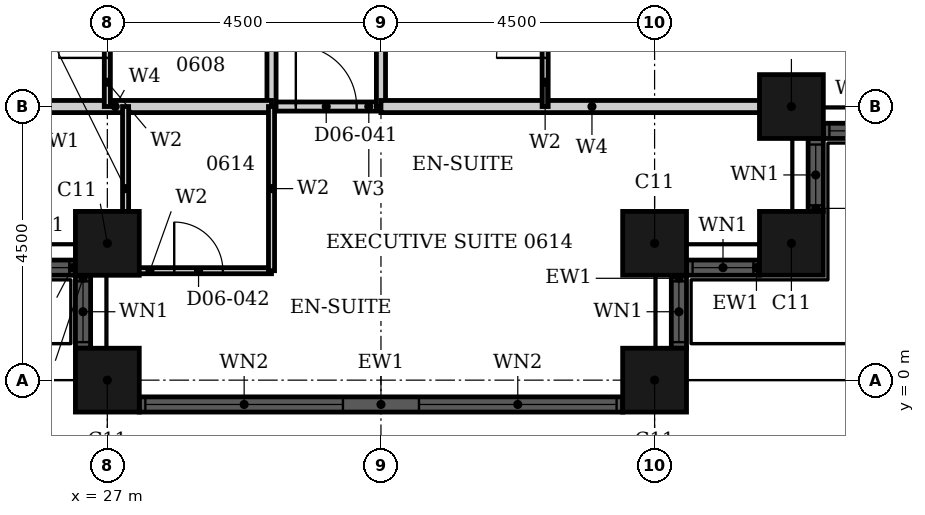
"""IFC4 building model, lengths in metres.
Left out: names, types, materials, properties, quantities, classifications, styles, units other than length and angle.
Written with IfcOpenShell. Run it as: python <this file> out.ifc"""

import sys

from ifc_helpers import new_model, si_unit, direction, frame, frame_2d, origin, origin_2d, place, context, subcontext, project, spatial, rectangle, hollow_rectangle, extrude, element, fill, save


model = new_model("IFC4")
c1 = context("Model", 3, precision=1e-05, world=origin(), true_north=direction((0.0, 1.0)))
c2 = subcontext(c1, "Body", "Model", "MODEL_VIEW")
j1 = project(units=[si_unit("LENGTHUNIT", "METRE"), si_unit("PLANEANGLEUNIT", "RADIAN")], contexts=[c1])
p1 = place(None, origin())
s1 = spatial("IfcSite", under=j1, at=p1, CompositionType="ELEMENT")
p2 = place(p1, origin())
s2 = spatial("IfcBuilding", under=s1, at=p2, CompositionType="ELEMENT")
p3 = place(p2, frame((0.0, 0.0, 33.6)))
s3 = spatial("IfcBuildingStorey", under=s2, at=p3, CompositionType="ELEMENT", Elevation=33.6)
for number, where, z_axis, x_axis in (
    (1, (27.0, 2.25, 0.0), (0.0, 0.0, 1.0), (1.0, 0.0, 0.0)),
    (2, (27.0, 0.0, 0.0), (0.0, 0.0, 1.0), (1.0, 0.0, 0.0)),
    (3, (36.0, 0.0, 0.0), (0.0, 0.0, 1.0), (1.0, 0.0, 0.0)),
    (4, (36.0, 2.25, 0.0), (0.0, 0.0, 1.0), (1.0, 0.0, 0.0)),
    (5, (38.25, 2.25, 0.0), (0.0, 0.0, 1.0), (1.0, 0.0, 0.0)),
    (6, (38.25, 4.5, 0.0), (0.0, 0.0, 1.0), (1.0, 0.0, 0.0)),
):
    element("IfcColumn", number, at=place(p3, frame(where, z_axis=z_axis, x_axis=x_axis)), inside=s3, PredefinedType="COLUMN", context=c2, shape_type="SweptSolid", body=[
        extrude(hollow_rectangle(XDim=1.05, YDim=1.05, WallThickness=0.034, at=origin_2d()), origin(), (0.0, 0.0, 1.0), 3.6),
    ])
p4 = place(p3, frame((25.275, 1.85, 0.0), z_axis=(0.0, 0.0, 1.0), x_axis=(1.0, 0.0, 0.0)))
e7 = element("IfcWall", 7, at=p4, inside=s3, PredefinedType="SOLIDWALL", context=c2, shape_type="SweptSolid", body=[
    extrude(rectangle(XDim=1.2, YDim=0.25, at=frame_2d((0.6, 0.0))), origin(), (0.0, 0.0, 1.0), 3.6),
])
p5 = place(p4, frame((0.1, 0.0, 0.9)))
e8 = element("IfcOpeningElement", 8, at=p5, cuts=e7, PredefinedType="OPENING", context=c2, shape_type="SweptSolid", body=[
    extrude(rectangle(XDim=1.0, YDim=2.08, at=frame_2d((0.5, 1.04))), frame((0.0, 0.135, 0.0), z_axis=(0.0, -1.0, 0.0), x_axis=(1.0, 0.0, 0.0)), (0.0, 0.0, 1.0), 0.27),
])
p6 = place(p3, frame((26.6, 1.725, 0.0), z_axis=(0.0, 0.0, 1.0), x_axis=(0.0, -1.0, 0.0)))
e9 = element("IfcWall", 9, at=p6, inside=s3, PredefinedType="SOLIDWALL", context=c2, shape_type="SweptSolid", body=[
    extrude(rectangle(XDim=1.2, YDim=0.25, at=frame_2d((0.6, 0.0))), origin(), (0.0, 0.0, 1.0), 3.6),
])
p7 = place(p6, frame((0.1, 0.0, 0.9)))
e10 = element("IfcOpeningElement", 10, at=p7, cuts=e9, PredefinedType="OPENING", context=c2, shape_type="SweptSolid", body=[
    extrude(rectangle(XDim=1.0, YDim=2.08, at=frame_2d((0.5, 1.04))), frame((0.0, 0.135, 0.0), z_axis=(0.0, -1.0, 0.0), x_axis=(1.0, 0.0, 0.0)), (0.0, 0.0, 1.0), 0.27),
])
p8 = place(p3, frame((27.525, -0.4, 0.0), z_axis=(0.0, 0.0, 1.0), x_axis=(1.0, 0.0, 0.0)))
e11 = element("IfcWall", 11, at=p8, inside=s3, PredefinedType="SOLIDWALL", context=c2, shape_type="SweptSolid", body=[
    extrude(rectangle(XDim=7.95, YDim=0.25, at=frame_2d((3.975, 0.0))), origin(), (0.0, 0.0, 1.0), 3.6),
])
p9 = place(p8, frame((0.1, 0.0, 0.9)))
e12 = element("IfcOpeningElement", 12, at=p9, cuts=e11, PredefinedType="OPENING", context=c2, shape_type="SweptSolid", body=[
    extrude(rectangle(XDim=3.25, YDim=2.08, at=frame_2d((1.625, 1.04))), frame((0.0, 0.135, 0.0), z_axis=(0.0, -1.0, 0.0), x_axis=(1.0, 0.0, 0.0)), (0.0, 0.0, 1.0), 0.27),
])
p10 = place(p8, frame((4.6, 0.0, 0.9)))
e13 = element("IfcOpeningElement", 13, at=p10, cuts=e11, PredefinedType="OPENING", context=c2, shape_type="SweptSolid", body=[
    extrude(rectangle(XDim=3.25, YDim=2.08, at=frame_2d((1.625, 1.04))), frame((0.0, 0.135, 0.0), z_axis=(0.0, -1.0, 0.0), x_axis=(1.0, 0.0, 0.0)), (0.0, 0.0, 1.0), 0.27),
])
p11 = place(p3, frame((36.4, 0.525, 0.0), z_axis=(0.0, 0.0, 1.0), x_axis=(0.0, 1.0, 0.0)))
e14 = element("IfcWall", 14, at=p11, inside=s3, PredefinedType="SOLIDWALL", context=c2, shape_type="SweptSolid", body=[
    extrude(rectangle(XDim=1.2, YDim=0.25, at=frame_2d((0.6, 0.0))), origin(), (0.0, 0.0, 1.0), 3.6),
])
p12 = place(p11, frame((0.1, 0.0, 0.9)))
e15 = element("IfcOpeningElement", 15, at=p12, cuts=e14, PredefinedType="OPENING", context=c2, shape_type="SweptSolid", body=[
    extrude(rectangle(XDim=1.0, YDim=2.08, at=frame_2d((0.5, 1.04))), frame((0.0, 0.135, 0.0), z_axis=(0.0, -1.0, 0.0), x_axis=(1.0, 0.0, 0.0)), (0.0, 0.0, 1.0), 0.27),
])
p13 = place(p3, frame((36.525, 1.85, 0.0), z_axis=(0.0, 0.0, 1.0), x_axis=(1.0, 0.0, 0.0)))
e16 = element("IfcWall", 16, at=p13, inside=s3, PredefinedType="SOLIDWALL", context=c2, shape_type="SweptSolid", body=[
    extrude(rectangle(XDim=1.2, YDim=0.25, at=frame_2d((0.6, 0.0))), origin(), (0.0, 0.0, 1.0), 3.6),
])
p14 = place(p13, frame((0.1, 0.0, 0.9)))
e17 = element("IfcOpeningElement", 17, at=p14, cuts=e16, PredefinedType="OPENING", context=c2, shape_type="SweptSolid", body=[
    extrude(rectangle(XDim=1.0, YDim=2.08, at=frame_2d((0.5, 1.04))), frame((0.0, 0.135, 0.0), z_axis=(0.0, -1.0, 0.0), x_axis=(1.0, 0.0, 0.0)), (0.0, 0.0, 1.0), 0.27),
])
p15 = place(p3, frame((38.65, 2.775, 0.0), z_axis=(0.0, 0.0, 1.0), x_axis=(0.0, 1.0, 0.0)))
e18 = element("IfcWall", 18, at=p15, inside=s3, PredefinedType="SOLIDWALL", context=c2, shape_type="SweptSolid", body=[
    extrude(rectangle(XDim=1.2, YDim=0.25, at=frame_2d((0.6, 0.0))), origin(), (0.0, 0.0, 1.0), 3.6),
])
p16 = place(p15, frame((0.1, 0.0, 0.9)))
e19 = element("IfcOpeningElement", 19, at=p16, cuts=e18, PredefinedType="OPENING", context=c2, shape_type="SweptSolid", body=[
    extrude(rectangle(XDim=1.0, YDim=2.08, at=frame_2d((0.5, 1.04))), frame((0.0, 0.135, 0.0), z_axis=(0.0, -1.0, 0.0), x_axis=(1.0, 0.0, 0.0)), (0.0, 0.0, 1.0), 0.27),
])
p17 = place(p3, frame((38.775, 4.1, 0.0), z_axis=(0.0, 0.0, 1.0), x_axis=(1.0, 0.0, 0.0)))
e20 = element("IfcWall", 20, at=p17, inside=s3, PredefinedType="SOLIDWALL", context=c2, shape_type="SweptSolid", body=[
    extrude(rectangle(XDim=1.2, YDim=0.25, at=frame_2d((0.6, 0.0))), origin(), (0.0, 0.0, 1.0), 3.6),
])
p18 = place(p17, frame((0.1, 0.0, 0.9)))
e21 = element("IfcOpeningElement", 21, at=p18, cuts=e20, PredefinedType="OPENING", context=c2, shape_type="SweptSolid", body=[
    extrude(rectangle(XDim=1.0, YDim=2.08, at=frame_2d((0.5, 1.04))), frame((0.0, 0.135, 0.0), z_axis=(0.0, -1.0, 0.0), x_axis=(1.0, 0.0, 0.0)), (0.0, 0.0, 1.0), 0.27),
])
p19 = place(p3, frame((29.7, 4.5, 0.0), z_axis=(0.0, 0.0, 1.0), x_axis=(1.0, 0.0, 0.0)))
e22 = element("IfcWall", 22, at=p19, inside=s3, PredefinedType="PARTITIONING", context=c2, shape_type="SweptSolid", body=[
    extrude(rectangle(XDim=1.8, YDim=0.15, at=frame_2d((0.9, 0.0))), origin(), (0.0, 0.0, 1.0), 3.3),
])
p20 = place(p19, frame((0.4, 0.0, 0.0)))
e23 = element("IfcOpeningElement", 23, at=p20, cuts=e22, PredefinedType="OPENING", context=c2, shape_type="SweptSolid", body=[
    extrude(rectangle(XDim=1.0, YDim=2.1, at=frame_2d((0.5, 1.05))), frame((0.0, 0.085, 0.0), z_axis=(0.0, -1.0, 0.0), x_axis=(1.0, 0.0, 0.0)), (0.0, 0.0, 1.0), 0.17),
])
p21 = place(p3, frame((29.7, 4.5, 0.0), z_axis=(0.0, 0.0, 1.0), x_axis=(0.0, 1.0, 0.0)))
e24 = element("IfcWall", 24, at=p21, inside=s3, PredefinedType="PARTITIONING", context=c2, shape_type="SweptSolid", body=[
    extrude(rectangle(XDim=16.2, YDim=0.15, at=frame_2d((8.1, 0.0))), origin(), (0.0, 0.0, 1.0), 3.3),
])
p22 = place(p21, frame((7.45, 0.0, 0.0)))
e25 = element("IfcOpeningElement", 25, at=p22, cuts=e24, PredefinedType="OPENING", context=c2, shape_type="SweptSolid", body=[
    extrude(rectangle(XDim=1.0, YDim=2.1, at=frame_2d((0.5, 1.05))), frame((0.0, 0.085, 0.0), z_axis=(0.0, -1.0, 0.0), x_axis=(1.0, 0.0, 0.0)), (0.0, 0.0, 1.0), 0.17),
])
p23 = place(p21, frame((2.95, 0.0, 0.0)))
e26 = element("IfcOpeningElement", 26, at=p23, cuts=e24, PredefinedType="OPENING", context=c2, shape_type="SweptSolid", body=[
    extrude(rectangle(XDim=1.0, YDim=2.1, at=frame_2d((0.5, 1.05))), frame((0.0, 0.085, 0.0), z_axis=(0.0, -1.0, 0.0), x_axis=(1.0, 0.0, 0.0)), (0.0, 0.0, 1.0), 0.17),
])
p24 = place(p3, frame((31.5, 4.5, 0.0), z_axis=(0.0, 0.0, 1.0), x_axis=(0.0, 1.0, 0.0)))
e27 = element("IfcWall", 27, at=p24, inside=s3, PredefinedType="PARTITIONING", context=c2, shape_type="SweptSolid", body=[
    extrude(rectangle(XDim=16.2, YDim=0.15, at=frame_2d((8.1, 0.0))), origin(), (0.0, 0.0, 1.0), 2.58),
])
p25 = place(p24, frame((7.45, 0.0, 0.0)))
e28 = element("IfcOpeningElement", 28, at=p25, cuts=e27, PredefinedType="OPENING", context=c2, shape_type="SweptSolid", body=[
    extrude(rectangle(XDim=1.0, YDim=2.1, at=frame_2d((0.5, 1.05))), frame((0.0, 0.085, 0.0), z_axis=(0.0, -1.0, 0.0), x_axis=(1.0, 0.0, 0.0)), (0.0, 0.0, 1.0), 0.17),
])
p26 = place(p24, frame((2.95, 0.0, 0.0)))
e29 = element("IfcOpeningElement", 29, at=p26, cuts=e27, PredefinedType="OPENING", context=c2, shape_type="SweptSolid", body=[
    extrude(rectangle(XDim=1.0, YDim=2.1, at=frame_2d((0.5, 1.05))), frame((0.0, 0.085, 0.0), z_axis=(0.0, -1.0, 0.0), x_axis=(1.0, 0.0, 0.0)), (0.0, 0.0, 1.0), 0.17),
])
p27 = place(p3, frame((31.5, 4.5, 0.0), z_axis=(0.0, 0.0, 1.0), x_axis=(1.0, 0.0, 0.0)))
e30 = element("IfcWall", 30, at=p27, inside=s3, PredefinedType="PARTITIONING", context=c2, shape_type="SweptSolid", body=[
    extrude(rectangle(XDim=6.94, YDim=0.2, at=frame_2d((3.47, 0.0))), origin(), (0.0, 0.0, 1.0), 3.3),
])
p28 = place(p3, frame((24.56, 4.5, 0.0), z_axis=(0.0, 0.0, 1.0), x_axis=(1.0, 0.0, 0.0)))
e31 = element("IfcWall", 31, at=p28, inside=s3, PredefinedType="PARTITIONING", context=c2, shape_type="SweptSolid", body=[
    extrude(rectangle(XDim=5.14, YDim=0.2, at=frame_2d((2.57, 0.0))), origin(), (0.0, 0.0, 1.0), 3.3),
])
p29 = place(p3, frame((27.3, 1.8, 0.0), z_axis=(0.0, 0.0, 1.0), x_axis=(1.0, 0.0, 0.0)))
e32 = element("IfcWall", 32, at=p29, inside=s3, PredefinedType="PARTITIONING", context=c2, shape_type="SweptSolid", body=[
    extrude(rectangle(XDim=2.4, YDim=0.1, at=frame_2d((1.2, 0.0))), origin(), (0.0, 0.0, 1.0), 3.3),
])
p30 = place(p29, frame((0.8, 0.0, 0.0)))
e33 = element("IfcOpeningElement", 33, at=p30, cuts=e32, PredefinedType="OPENING", context=c2, shape_type="SweptSolid", body=[
    extrude(rectangle(XDim=0.8, YDim=2.1, at=frame_2d((0.4, 1.05))), frame((0.0, 0.06, 0.0), z_axis=(0.0, -1.0, 0.0), x_axis=(1.0, 0.0, 0.0)), (0.0, 0.0, 1.0), 0.12),
])
p31 = place(p3, frame((27.0, 4.5, 0.0), z_axis=(0.0, 0.0, 1.0), x_axis=(0.0, 1.0, 0.0)))
e34 = element("IfcWall", 34, at=p31, inside=s3, PredefinedType="PARTITIONING", context=c2, shape_type="SweptSolid", body=[
    extrude(rectangle(XDim=2.4, YDim=0.1, at=frame_2d((1.2, 0.0))), origin(), (0.0, 0.0, 1.0), 2.58),
])
p32 = place(p31, frame((0.8, 0.0, 0.0)))
e35 = element("IfcOpeningElement", 35, at=p32, cuts=e34, PredefinedType="OPENING", context=c2, shape_type="SweptSolid", body=[
    extrude(rectangle(XDim=0.8, YDim=2.1, at=frame_2d((0.4, 1.05))), frame((0.0, 0.06, 0.0), z_axis=(0.0, -1.0, 0.0), x_axis=(1.0, 0.0, 0.0)), (0.0, 0.0, 1.0), 0.12),
])
for number, where, z_axis, x_axis in (
    (36, (27.3, 1.8, 0.0), (0.0, 0.0, 1.0), (0.0, 1.0, 0.0)),
    (37, (29.7, 1.8, 0.0), (0.0, 0.0, 1.0), (0.0, 1.0, 0.0)),
):
    element("IfcWall", number, at=place(p3, frame(where, z_axis=z_axis, x_axis=x_axis)), inside=s3, PredefinedType="PARTITIONING", context=c2, shape_type="SweptSolid", body=[
        extrude(rectangle(XDim=2.7, YDim=0.1, at=frame_2d((1.35, 0.0))), origin(), (0.0, 0.0, 1.0), 3.3),
    ])
p33 = place(p3, frame((34.2, 4.5, 0.0), z_axis=(0.0, 0.0, 1.0), x_axis=(0.0, 1.0, 0.0)))
e38 = element("IfcWall", 38, at=p33, inside=s3, PredefinedType="PARTITIONING", context=c2, shape_type="SweptSolid", body=[
    extrude(rectangle(XDim=2.4, YDim=0.1, at=frame_2d((1.2, 0.0))), origin(), (0.0, 0.0, 1.0), 3.3),
])
p34 = place(p33, frame((0.8, 0.0, 0.0)))
e39 = element("IfcOpeningElement", 39, at=p34, cuts=e38, PredefinedType="OPENING", context=c2, shape_type="SweptSolid", body=[
    extrude(rectangle(XDim=0.8, YDim=2.1, at=frame_2d((0.4, 1.05))), frame((0.0, 0.06, 0.0), z_axis=(0.0, -1.0, 0.0), x_axis=(1.0, 0.0, 0.0)), (0.0, 0.0, 1.0), 0.12),
])
p35 = place(p5, origin())
e40 = element("IfcWindow", 40, at=p35, inside=s3, PartitioningType="SINGLE_PANEL", PredefinedType="WINDOW", context=c2, shape_type="SweptSolid", body=[
    extrude(rectangle(XDim=1.0, YDim=2.08, at=frame_2d((0.5, 1.04))), frame((0.0, 0.03, 0.0), z_axis=(0.0, -1.0, 0.0), x_axis=(1.0, 0.0, 0.0)), (0.0, 0.0, 1.0), 0.06),
])
fill(e8, e40)
p36 = place(p7, origin())
e41 = element("IfcWindow", 41, at=p36, inside=s3, PartitioningType="SINGLE_PANEL", PredefinedType="WINDOW", context=c2, shape_type="SweptSolid", body=[
    extrude(rectangle(XDim=1.0, YDim=2.08, at=frame_2d((0.5, 1.04))), frame((0.0, 0.03, 0.0), z_axis=(0.0, -1.0, 0.0), x_axis=(1.0, 0.0, 0.0)), (0.0, 0.0, 1.0), 0.06),
])
fill(e10, e41)
p37 = place(p9, origin())
e42 = element("IfcWindow", 42, at=p37, inside=s3, PartitioningType="SINGLE_PANEL", PredefinedType="WINDOW", context=c2, shape_type="SweptSolid", body=[
    extrude(rectangle(XDim=3.25, YDim=2.08, at=frame_2d((1.625, 1.04))), frame((0.0, 0.03, 0.0), z_axis=(0.0, -1.0, 0.0), x_axis=(1.0, 0.0, 0.0)), (0.0, 0.0, 1.0), 0.06),
])
fill(e12, e42)
p38 = place(p10, origin())
e43 = element("IfcWindow", 43, at=p38, inside=s3, PartitioningType="SINGLE_PANEL", PredefinedType="WINDOW", context=c2, shape_type="SweptSolid", body=[
    extrude(rectangle(XDim=3.25, YDim=2.08, at=frame_2d((1.625, 1.04))), frame((0.0, 0.03, 0.0), z_axis=(0.0, -1.0, 0.0), x_axis=(1.0, 0.0, 0.0)), (0.0, 0.0, 1.0), 0.06),
])
fill(e13, e43)
p39 = place(p12, origin())
e44 = element("IfcWindow", 44, at=p39, inside=s3, PartitioningType="SINGLE_PANEL", PredefinedType="WINDOW", context=c2, shape_type="SweptSolid", body=[
    extrude(rectangle(XDim=1.0, YDim=2.08, at=frame_2d((0.5, 1.04))), frame((0.0, 0.03, 0.0), z_axis=(0.0, -1.0, 0.0), x_axis=(1.0, 0.0, 0.0)), (0.0, 0.0, 1.0), 0.06),
])
fill(e15, e44)
p40 = place(p14, origin())
e45 = element("IfcWindow", 45, at=p40, inside=s3, PartitioningType="SINGLE_PANEL", PredefinedType="WINDOW", context=c2, shape_type="SweptSolid", body=[
    extrude(rectangle(XDim=1.0, YDim=2.08, at=frame_2d((0.5, 1.04))), frame((0.0, 0.03, 0.0), z_axis=(0.0, -1.0, 0.0), x_axis=(1.0, 0.0, 0.0)), (0.0, 0.0, 1.0), 0.06),
])
fill(e17, e45)
p41 = place(p16, origin())
e46 = element("IfcWindow", 46, at=p41, inside=s3, PartitioningType="SINGLE_PANEL", PredefinedType="WINDOW", context=c2, shape_type="SweptSolid", body=[
    extrude(rectangle(XDim=1.0, YDim=2.08, at=frame_2d((0.5, 1.04))), frame((0.0, 0.03, 0.0), z_axis=(0.0, -1.0, 0.0), x_axis=(1.0, 0.0, 0.0)), (0.0, 0.0, 1.0), 0.06),
])
fill(e19, e46)
p42 = place(p18, origin())
e47 = element("IfcWindow", 47, at=p42, inside=s3, PartitioningType="SINGLE_PANEL", PredefinedType="WINDOW", context=c2, shape_type="SweptSolid", body=[
    extrude(rectangle(XDim=1.0, YDim=2.08, at=frame_2d((0.5, 1.04))), frame((0.0, 0.03, 0.0), z_axis=(0.0, -1.0, 0.0), x_axis=(1.0, 0.0, 0.0)), (0.0, 0.0, 1.0), 0.06),
])
fill(e21, e47)
p43 = place(p32, origin())
e48 = element("IfcDoor", 48, at=p43, inside=s3, OperationType="SINGLE_SWING_LEFT", PredefinedType="DOOR", context=c2, shape_type="SweptSolid", body=[
    extrude(rectangle(XDim=0.8, YDim=2.1, at=frame_2d((0.4, 1.05))), frame((0.0, 0.025, 0.0), z_axis=(0.0, -1.0, 0.0), x_axis=(1.0, 0.0, 0.0)), (0.0, 0.0, 1.0), 0.05),
])
fill(e35, e48)
p44 = place(p34, origin())
e49 = element("IfcDoor", 49, at=p44, inside=s3, OperationType="SINGLE_SWING_RIGHT", PredefinedType="DOOR", context=c2, shape_type="SweptSolid", body=[
    extrude(rectangle(XDim=0.8, YDim=2.1, at=frame_2d((0.4, 1.05))), frame((0.0, 0.025, 0.0), z_axis=(0.0, -1.0, 0.0), x_axis=(1.0, 0.0, 0.0)), (0.0, 0.0, 1.0), 0.05),
])
fill(e39, e49)
p45 = place(p20, origin())
e50 = element("IfcDoor", 50, at=p45, inside=s3, OperationType="SINGLE_SWING_LEFT", PredefinedType="DOOR", context=c2, shape_type="SweptSolid", body=[
    extrude(rectangle(XDim=1.0, YDim=2.1, at=frame_2d((0.5, 1.05))), frame((0.0, 0.025, 0.0), z_axis=(0.0, -1.0, 0.0), x_axis=(1.0, 0.0, 0.0)), (0.0, 0.0, 1.0), 0.05),
])
fill(e23, e50)
p46 = place(p30, origin())
e51 = element("IfcDoor", 51, at=p46, inside=s3, OperationType="SINGLE_SWING_RIGHT", PredefinedType="DOOR", context=c2, shape_type="SweptSolid", body=[
    extrude(rectangle(XDim=0.8, YDim=2.1, at=frame_2d((0.4, 1.05))), frame((0.0, 0.025, 0.0), z_axis=(0.0, -1.0, 0.0), x_axis=(1.0, 0.0, 0.0)), (0.0, 0.0, 1.0), 0.05),
])
fill(e33, e51)
save(model, sys.argv[1])
